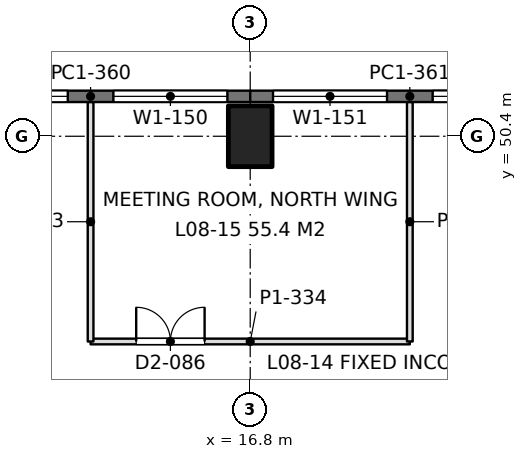
"""IFC4 building model, lengths in metres.
Left out: names, types, materials, properties, quantities, classifications, styles, units other than length and angle.
Written with IfcOpenShell. Run it as: python <this file> out.ifc"""

import sys

from ifc_helpers import new_model, si_unit, direction, frame, frame_2d, origin, origin_2d, place, context, subcontext, project, spatial, rectangle, extrude, element, fill, save


model = new_model("IFC4")
c1 = context("Model", 3, precision=1e-05, world=origin(), true_north=direction((0.0, 1.0)))
c2 = subcontext(c1, "Body", "Model", "MODEL_VIEW")
j1 = project(units=[si_unit("LENGTHUNIT", "METRE"), si_unit("PLANEANGLEUNIT", "RADIAN")], contexts=[c1])
p1 = place(None, origin())
s1 = spatial("IfcSite", under=j1, at=p1, CompositionType="ELEMENT")
p2 = place(p1, origin())
s2 = spatial("IfcBuilding", under=s1, at=p2, CompositionType="ELEMENT")
p3 = place(p2, frame((0.0, 0.0, 36.9)))
s3 = spatial("IfcBuildingStorey", under=s2, at=p3, CompositionType="ELEMENT", Elevation=36.9)
p4 = place(p3, frame((16.8, 50.4, 0.0), z_axis=(0.0, 0.0, 1.0), x_axis=(1.0, 0.0, 0.0)))
e1 = element("IfcColumn", 1, at=p4, inside=s3, PredefinedType="COLUMN", context=c2, shape_type="SweptSolid", body=[
    extrude(rectangle(XDim=1.15, YDim=1.6, at=origin_2d()), origin(), (0.0, 0.0, 1.0), 4.5),
])
p5 = place(p3, frame((8.4, 51.45, 0.0), z_axis=(0.0, 0.0, 1.0), x_axis=(1.0, 0.0, 0.0)))
e2 = element("IfcWall", 2, at=p5, inside=s3, PredefinedType="SOLIDWALL", context=c2, shape_type="SweptSolid", body=[
    extrude(rectangle(XDim=8.4, YDim=0.3, at=frame_2d((4.2, 0.0))), origin(), (0.0, 0.0, 1.0), 4.34),
])
p6 = place(p5, frame((0.6, 0.0, 0.9)))
e3 = element("IfcOpeningElement", 3, at=p6, cuts=e2, PredefinedType="OPENING", context=c2, shape_type="SweptSolid", body=[
    extrude(rectangle(XDim=3.0, YDim=1.9, at=frame_2d((1.5, 0.95))), frame((0.0, 0.16, 0.0), z_axis=(0.0, -1.0, 0.0), x_axis=(1.0, 0.0, 0.0)), (0.0, 0.0, 1.0), 0.32),
])
p7 = place(p5, frame((4.8, 0.0, 0.9)))
e4 = element("IfcOpeningElement", 4, at=p7, cuts=e2, PredefinedType="OPENING", context=c2, shape_type="SweptSolid", body=[
    extrude(rectangle(XDim=3.0, YDim=1.9, at=frame_2d((1.5, 0.95))), frame((0.0, 0.16, 0.0), z_axis=(0.0, -1.0, 0.0), x_axis=(1.0, 0.0, 0.0)), (0.0, 0.0, 1.0), 0.32),
])
p8 = place(p3, frame((16.8, 51.45, 0.0), z_axis=(0.0, 0.0, 1.0), x_axis=(1.0, 0.0, 0.0)))
e5 = element("IfcWall", 5, at=p8, inside=s3, PredefinedType="SOLIDWALL", context=c2, shape_type="SweptSolid", body=[
    extrude(rectangle(XDim=8.4, YDim=0.3, at=frame_2d((4.2, 0.0))), origin(), (0.0, 0.0, 1.0), 4.34),
])
p9 = place(p8, frame((0.6, 0.0, 0.9)))
e6 = element("IfcOpeningElement", 6, at=p9, cuts=e5, PredefinedType="OPENING", context=c2, shape_type="SweptSolid", body=[
    extrude(rectangle(XDim=3.0, YDim=1.9, at=frame_2d((1.5, 0.95))), frame((0.0, 0.16, 0.0), z_axis=(0.0, -1.0, 0.0), x_axis=(1.0, 0.0, 0.0)), (0.0, 0.0, 1.0), 0.32),
])
p10 = place(p8, frame((4.8, 0.0, 0.9)))
e7 = element("IfcOpeningElement", 7, at=p10, cuts=e5, PredefinedType="OPENING", context=c2, shape_type="SweptSolid", body=[
    extrude(rectangle(XDim=3.0, YDim=1.9, at=frame_2d((1.5, 0.95))), frame((0.0, 0.16, 0.0), z_axis=(0.0, -1.0, 0.0), x_axis=(1.0, 0.0, 0.0)), (0.0, 0.0, 1.0), 0.32),
])
p11 = place(p3, frame((12.6, 45.0, 0.0), z_axis=(0.0, 0.0, 1.0), x_axis=(1.0, 0.0, 0.0)))
e8 = element("IfcWall", 8, at=p11, inside=s3, PredefinedType="PARTITIONING", context=c2, shape_type="SweptSolid", body=[
    extrude(rectangle(XDim=8.4, YDim=0.15, at=frame_2d((4.2, 0.0))), origin(), (0.0, 0.0, 1.0), 3.74),
])
p12 = place(p11, frame((1.2, 0.0, 0.0)))
e9 = element("IfcOpeningElement", 9, at=p12, cuts=e8, PredefinedType="OPENING", context=c2, shape_type="SweptSolid", body=[
    extrude(rectangle(XDim=1.8, YDim=2.2, at=frame_2d((0.9, 1.1))), frame((0.0, 0.085, 0.0), z_axis=(0.0, -1.0, 0.0), x_axis=(1.0, 0.0, 0.0)), (0.0, 0.0, 1.0), 0.17),
])
for number, where, z_axis, x_axis in (
    (10, (12.6, 45.0, 0.0), (0.0, 0.0, 1.0), (0.0, 1.0, 0.0)),
    (11, (21.0, 45.0, 0.0), (0.0, 0.0, 1.0), (0.0, 1.0, 0.0)),
):
    element("IfcWall", number, at=place(p3, frame(where, z_axis=z_axis, x_axis=x_axis)), inside=s3, PredefinedType="PARTITIONING", context=c2, shape_type="SweptSolid", body=[
        extrude(rectangle(XDim=6.302, YDim=0.15, at=frame_2d((3.151, 0.0))), origin(), (0.0, 0.0, 1.0), 3.84),
    ])
p13 = place(p6, origin())
e12 = element("IfcWindow", 12, at=p13, inside=s3, PartitioningType="SINGLE_PANEL", PredefinedType="WINDOW", context=c2, shape_type="SweptSolid", body=[
    extrude(rectangle(XDim=3.0, YDim=1.9, at=frame_2d((1.5, 0.95))), frame((0.0, 0.03, 0.0), z_axis=(0.0, -1.0, 0.0), x_axis=(1.0, 0.0, 0.0)), (0.0, 0.0, 1.0), 0.06),
])
fill(e3, e12)
p14 = place(p7, origin())
e13 = element("IfcWindow", 13, at=p14, inside=s3, PartitioningType="SINGLE_PANEL", PredefinedType="WINDOW", context=c2, shape_type="SweptSolid", body=[
    extrude(rectangle(XDim=3.0, YDim=1.9, at=frame_2d((1.5, 0.95))), frame((0.0, 0.03, 0.0), z_axis=(0.0, -1.0, 0.0), x_axis=(1.0, 0.0, 0.0)), (0.0, 0.0, 1.0), 0.06),
])
fill(e4, e13)
p15 = place(p9, origin())
e14 = element("IfcWindow", 14, at=p15, inside=s3, PartitioningType="SINGLE_PANEL", PredefinedType="WINDOW", context=c2, shape_type="SweptSolid", body=[
    extrude(rectangle(XDim=3.0, YDim=1.9, at=frame_2d((1.5, 0.95))), frame((0.0, 0.03, 0.0), z_axis=(0.0, -1.0, 0.0), x_axis=(1.0, 0.0, 0.0)), (0.0, 0.0, 1.0), 0.06),
])
fill(e6, e14)
p16 = place(p10, origin())
e15 = element("IfcWindow", 15, at=p16, inside=s3, PartitioningType="SINGLE_PANEL", PredefinedType="WINDOW", context=c2, shape_type="SweptSolid", body=[
    extrude(rectangle(XDim=3.0, YDim=1.9, at=frame_2d((1.5, 0.95))), frame((0.0, 0.03, 0.0), z_axis=(0.0, -1.0, 0.0), x_axis=(1.0, 0.0, 0.0)), (0.0, 0.0, 1.0), 0.06),
])
fill(e7, e15)
p17 = place(p12, origin())
e16 = element("IfcDoor", 16, at=p17, inside=s3, OperationType="DOUBLE_DOOR_SINGLE_SWING", PredefinedType="DOOR", context=c2, shape_type="SweptSolid", body=[
    extrude(rectangle(XDim=1.8, YDim=2.2, at=frame_2d((0.9, 1.1))), frame((0.0, 0.025, 0.0), z_axis=(0.0, -1.0, 0.0), x_axis=(1.0, 0.0, 0.0)), (0.0, 0.0, 1.0), 0.05),
])
fill(e9, e16)
save(model, sys.argv[1])
